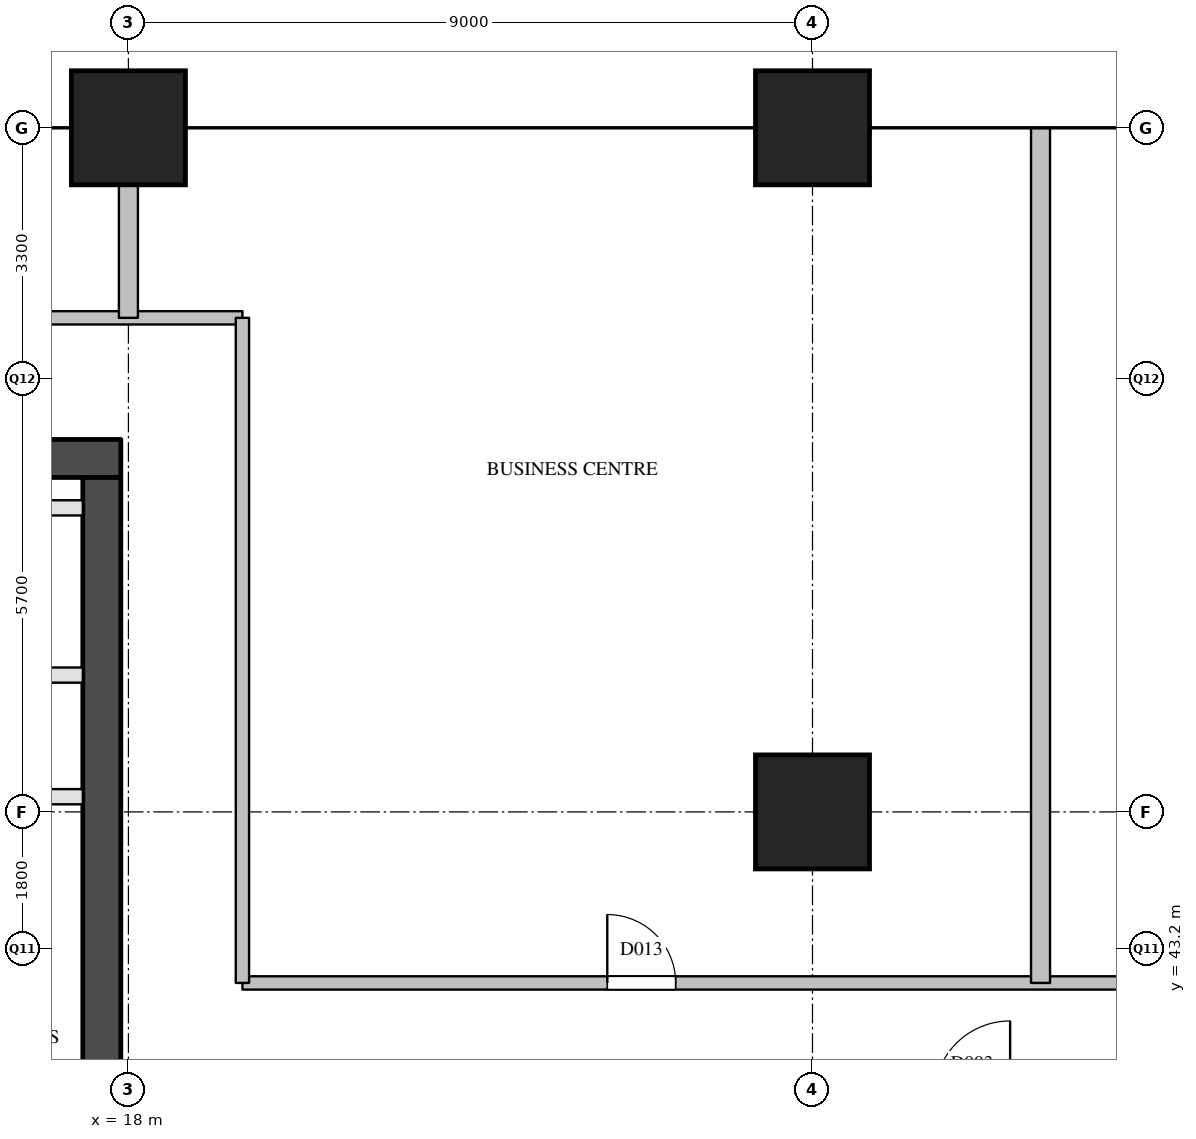
"""IFC4 building model, lengths in metres.
Left out: names, types, materials, properties, quantities, classifications, styles, units other than length and angle.
Written with IfcOpenShell. Run it as: python <this file> out.ifc"""

import sys

from ifc_helpers import new_model, si_unit, direction, frame, frame_2d, origin, origin_2d, place, context, subcontext, project, spatial, rectangle, extrude, element, fill, save


model = new_model("IFC4")
c1 = context("Model", 3, precision=1e-05, world=origin(), true_north=direction((0.0, 1.0)))
c2 = subcontext(c1, "Body", "Model", "MODEL_VIEW")
j1 = project(units=[si_unit("LENGTHUNIT", "METRE"), si_unit("PLANEANGLEUNIT", "RADIAN")], contexts=[c1])
p1 = place(None, origin())
s1 = spatial("IfcSite", under=j1, at=p1, CompositionType="ELEMENT")
p2 = place(p1, origin())
s2 = spatial("IfcBuilding", under=s1, at=p2, CompositionType="ELEMENT")
p3 = place(p2, frame((0.0, 0.0, 158.3)))
s3 = spatial("IfcBuildingStorey", under=s2, at=p3, CompositionType="ELEMENT", Elevation=158.3)
for number, where, z_axis, x_axis in (
    (1, (18.0, 54.0, 0.0), (0.0, 0.0, 1.0), (1.0, 0.0, 0.0)),
    (2, (27.0, 45.0, 0.0), (0.0, 0.0, 1.0), (1.0, 0.0, 0.0)),
    (3, (27.0, 54.0, 0.0), (0.0, 0.0, 1.0), (1.0, 0.0, 0.0)),
):
    element("IfcColumn", number, at=place(p3, frame(where, z_axis=z_axis, x_axis=x_axis)), inside=s3, PredefinedType="COLUMN", context=c2, shape_type="SweptSolid", body=[
        extrude(rectangle(XDim=1.5, YDim=1.5, at=origin_2d()), origin(), (0.0, 0.0, 1.0), 3.9),
    ])
p4 = place(p3, frame((5.7, 49.65, 0.0), z_axis=(0.0, 0.0, 1.0), x_axis=(1.0, 0.0, 0.0)))
e4 = element("IfcWall", 4, at=p4, inside=s3, PredefinedType="SHEAR", context=c2, shape_type="SweptSolid", body=[
    extrude(rectangle(XDim=12.2, YDim=0.5, at=frame_2d((6.1, 0.0))), origin(), (0.0, 0.0, 1.0), 3.6),
])
p5 = place(p3, frame((17.65, 29.1, 0.0), z_axis=(0.0, 0.0, 1.0), x_axis=(0.0, 1.0, 0.0)))
e5 = element("IfcWall", 5, at=p5, inside=s3, PredefinedType="SHEAR", context=c2, shape_type="SweptSolid", body=[
    extrude(rectangle(XDim=20.3, YDim=0.5, at=frame_2d((10.15, 0.0))), origin(), (0.0, 0.0, 1.0), 3.6),
])
p6 = place(p5, frame((1.25, 0.0, 0.0)))
e6 = element("IfcOpeningElement", 6, at=p6, cuts=e5, PredefinedType="OPENING", context=c2, shape_type="SweptSolid", body=[
    extrude(rectangle(XDim=0.7, YDim=2.1, at=frame_2d((0.35, 1.05))), frame((0.0, 0.26, 0.0), z_axis=(0.0, -1.0, 0.0), x_axis=(1.0, 0.0, 0.0)), (0.0, 0.0, 1.0), 0.52),
])
p7 = place(p5, frame((7.05, 0.0, 0.0)))
e7 = element("IfcOpeningElement", 7, at=p7, cuts=e5, PredefinedType="OPENING", context=c2, shape_type="SweptSolid", body=[
    extrude(rectangle(XDim=0.7, YDim=2.1, at=frame_2d((0.35, 1.05))), frame((0.0, 0.26, 0.0), z_axis=(0.0, -1.0, 0.0), x_axis=(1.0, 0.0, 0.0)), (0.0, 0.0, 1.0), 0.52),
])
p8 = place(p5, frame((3.6, 0.0, 0.0)))
e8 = element("IfcOpeningElement", 8, at=p8, cuts=e5, PredefinedType="OPENING", context=c2, shape_type="SweptSolid", body=[
    extrude(rectangle(XDim=1.8, YDim=2.1, at=frame_2d((0.9, 1.05))), frame((0.0, 0.26, 0.0), z_axis=(0.0, -1.0, 0.0), x_axis=(1.0, 0.0, 0.0)), (0.0, 0.0, 1.0), 0.52),
])
p9 = place(p3, frame((12.5, 45.2, 0.0), z_axis=(0.0, 0.0, 1.0), x_axis=(1.0, 0.0, 0.0)))
e9 = element("IfcWall", 9, at=p9, inside=s3, PredefinedType="PARTITIONING", context=c2, shape_type="SweptSolid", body=[
    extrude(rectangle(XDim=4.9, YDim=0.2, at=frame_2d((2.45, 0.0))), origin(), (0.0, 0.0, 1.0), 3.6),
])
p10 = place(p9, frame((1.02, 0.0, 0.0)))
e10 = element("IfcOpeningElement", 10, at=p10, cuts=e9, PredefinedType="OPENING", context=c2, shape_type="SweptSolid", body=[
    extrude(rectangle(XDim=0.9, YDim=2.1, at=frame_2d((0.45, 1.05))), frame((0.0, 0.11, 0.0), z_axis=(0.0, -1.0, 0.0), x_axis=(1.0, 0.0, 0.0)), (0.0, 0.0, 1.0), 0.22),
])
p11 = place(p9, frame((3.47, 0.0, 0.0)))
e11 = element("IfcOpeningElement", 11, at=p11, cuts=e9, PredefinedType="OPENING", context=c2, shape_type="SweptSolid", body=[
    extrude(rectangle(XDim=0.9, YDim=2.1, at=frame_2d((0.45, 1.05))), frame((0.0, 0.11, 0.0), z_axis=(0.0, -1.0, 0.0), x_axis=(1.0, 0.0, 0.0)), (0.0, 0.0, 1.0), 0.22),
])
p12 = place(p3, frame((6.2, 46.8, 0.0), z_axis=(0.0, 0.0, 1.0), x_axis=(1.0, 0.0, 0.0)))
e12 = element("IfcWall", 12, at=p12, inside=s3, PredefinedType="PARTITIONING", context=c2, shape_type="SweptSolid", body=[
    extrude(rectangle(XDim=11.2, YDim=0.2, at=frame_2d((5.6, 0.0))), origin(), (0.0, 0.0, 1.0), 3.6),
])
p13 = place(p12, frame((2.35, 0.0, 0.0)))
e13 = element("IfcOpeningElement", 13, at=p13, cuts=e12, PredefinedType="OPENING", context=c2, shape_type="SweptSolid", body=[
    extrude(rectangle(XDim=0.9, YDim=2.1, at=frame_2d((0.45, 1.05))), frame((0.0, 0.11, 0.0), z_axis=(0.0, -1.0, 0.0), x_axis=(1.0, 0.0, 0.0)), (0.0, 0.0, 1.0), 0.22),
])
p14 = place(p12, frame((7.95, 0.0, 0.0)))
e14 = element("IfcOpeningElement", 14, at=p14, cuts=e12, PredefinedType="OPENING", context=c2, shape_type="SweptSolid", body=[
    extrude(rectangle(XDim=0.9, YDim=2.1, at=frame_2d((0.45, 1.05))), frame((0.0, 0.11, 0.0), z_axis=(0.0, -1.0, 0.0), x_axis=(1.0, 0.0, 0.0)), (0.0, 0.0, 1.0), 0.22),
])
p15 = place(p3, frame((6.2, 49.0, 0.0), z_axis=(0.0, 0.0, 1.0), x_axis=(1.0, 0.0, 0.0)))
e15 = element("IfcWall", 15, at=p15, inside=s3, PredefinedType="PARTITIONING", context=c2, shape_type="SweptSolid", body=[
    extrude(rectangle(XDim=11.2, YDim=0.2, at=frame_2d((5.6, 0.0))), origin(), (0.0, 0.0, 1.0), 3.6),
])
p16 = place(p3, frame((19.5, 42.75, 0.0), z_axis=(0.0, 0.0, 1.0), x_axis=(1.0, 0.0, 0.0)))
e16 = element("IfcWall", 16, at=p16, inside=s3, PredefinedType="PARTITIONING", context=c2, shape_type="SweptSolid", body=[
    extrude(rectangle(XDim=15.0, YDim=0.175, at=frame_2d((7.5, 0.0))), origin(), (0.0, 0.0, 1.0), 2.6),
])
p17 = place(p16, frame((4.8, 0.0, 0.0)))
e17 = element("IfcOpeningElement", 17, at=p17, cuts=e16, PredefinedType="OPENING", context=c2, shape_type="SweptSolid", body=[
    extrude(rectangle(XDim=0.9, YDim=2.1, at=frame_2d((0.45, 1.05))), frame((0.0, 0.097, 0.0), z_axis=(0.0, -1.0, 0.0), x_axis=(1.0, 0.0, 0.0)), (0.0, 0.0, 1.0), 0.195),
])
p18 = place(p3, frame((4.1, 51.5, 0.0), z_axis=(0.0, 0.0, 1.0), x_axis=(1.0, 0.0, 0.0)))
e18 = element("IfcWall", 18, at=p18, inside=s3, PredefinedType="PARTITIONING", context=c2, shape_type="SweptSolid", body=[
    extrude(rectangle(XDim=15.4, YDim=0.175, at=frame_2d((7.7, 0.0))), origin(), (0.0, 0.0, 1.0), 3.6),
])
p19 = place(p3, frame((19.5, 42.75, 0.0), z_axis=(0.0, 0.0, 1.0), x_axis=(0.0, 1.0, 0.0)))
e19 = element("IfcWall", 19, at=p19, inside=s3, PredefinedType="PARTITIONING", context=c2, shape_type="SweptSolid", body=[
    extrude(rectangle(XDim=8.75, YDim=0.175, at=frame_2d((4.375, 0.0))), origin(), (0.0, 0.0, 1.0), 3.6),
])
p20 = place(p3, frame((18.0, 51.5, 0.0), z_axis=(0.0, 0.0, 1.0), x_axis=(0.0, 1.0, 0.0)))
e20 = element("IfcWall", 20, at=p20, inside=s3, PredefinedType="PARTITIONING", context=c2, shape_type="SweptSolid", body=[
    extrude(rectangle(XDim=2.5, YDim=0.25, at=frame_2d((1.25, 0.0))), origin(), (0.0, 0.0, 1.0), 3.6),
])
p21 = place(p3, frame((30.0, 42.75, 0.0), z_axis=(0.0, 0.0, 1.0), x_axis=(0.0, 1.0, 0.0)))
e21 = element("IfcWall", 21, at=p21, inside=s3, PredefinedType="PARTITIONING", context=c2, shape_type="SweptSolid", body=[
    extrude(rectangle(XDim=11.25, YDim=0.25, at=frame_2d((5.625, 0.0))), origin(), (0.0, 0.0, 1.0), 2.6),
])
p22 = place(p17, origin())
e22 = element("IfcDoor", 22, at=p22, inside=s3, OperationType="SINGLE_SWING_LEFT", PredefinedType="DOOR", context=c2, shape_type="SweptSolid", body=[
    extrude(rectangle(XDim=0.9, YDim=2.1, at=frame_2d((0.45, 1.05))), frame((0.0, 0.025, 0.0), z_axis=(0.0, -1.0, 0.0), x_axis=(1.0, 0.0, 0.0)), (0.0, 0.0, 1.0), 0.05),
])
fill(e17, e22)
save(model, sys.argv[1])
